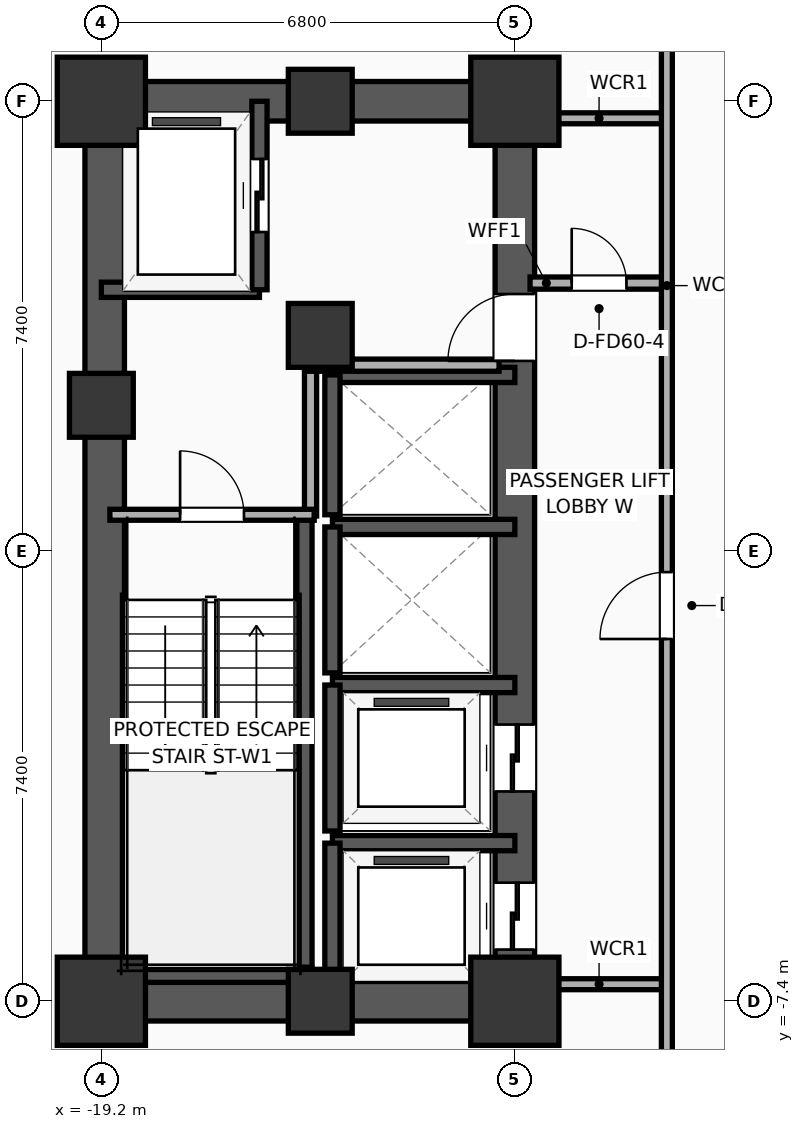
"""IFC4 building model, lengths in metres.
Left out: names, types, materials, properties, quantities, classifications, styles, units other than length and angle.
Written with IfcOpenShell. Run it as: python <this file> out.ifc"""

import sys

from ifc_helpers import new_model, si_unit, direction, frame, frame_2d, origin, origin_2d, place, context, subcontext, project, spatial, rectangle, extrude, element, fill, save


model = new_model("IFC4")
c1 = context("Model", 3, precision=1e-05, world=origin(), true_north=direction((0.0, 1.0)))
c2 = subcontext(c1, "Body", "Model", "MODEL_VIEW")
j1 = project(units=[si_unit("LENGTHUNIT", "METRE"), si_unit("PLANEANGLEUNIT", "RADIAN")], contexts=[c1])
p1 = place(None, origin())
s1 = spatial("IfcSite", under=j1, at=p1, CompositionType="ELEMENT")
p2 = place(p1, origin())
s2 = spatial("IfcBuilding", under=s1, at=p2, CompositionType="ELEMENT")
p3 = place(p2, frame((0.0, 0.0, 72.8)))
s3 = spatial("IfcBuildingStorey", under=s2, at=p3, CompositionType="ELEMENT", Elevation=72.8)
p4 = place(p3, frame((-19.2, -7.4, 0.0), z_axis=(0.0, 0.0, 1.0), x_axis=(1.0, 0.0, 0.0)))
e1 = element("IfcColumn", 1, at=p4, inside=s3, PredefinedType="COLUMN", context=c2, shape_type="SweptSolid", body=[
    extrude(rectangle(XDim=1.45, YDim=1.45, at=origin_2d()), origin(), (0.0, 0.0, 1.0), 3.9),
])
p5 = place(p3, frame((-19.2, 2.4, 0.0), z_axis=(0.0, 0.0, 1.0), x_axis=(1.0, 0.0, 0.0)))
e2 = element("IfcColumn", 2, at=p5, inside=s3, PredefinedType="COLUMN", context=c2, shape_type="SweptSolid", body=[
    extrude(rectangle(XDim=1.05, YDim=1.05, at=origin_2d()), origin(), (0.0, 0.0, 1.0), 3.9),
])
p6 = place(p3, frame((-19.2, 7.4, 0.0), z_axis=(0.0, 0.0, 1.0), x_axis=(1.0, 0.0, 0.0)))
e3 = element("IfcColumn", 3, at=p6, inside=s3, PredefinedType="COLUMN", context=c2, shape_type="SweptSolid", body=[
    extrude(rectangle(XDim=1.45, YDim=1.45, at=origin_2d()), origin(), (0.0, 0.0, 1.0), 3.9),
])
for number, where, z_axis, x_axis in (
    (4, (-15.6, -7.4, 0.0), (0.0, 0.0, 1.0), (1.0, 0.0, 0.0)),
    (5, (-15.6, 7.4, 0.0), (0.0, 0.0, 1.0), (1.0, 0.0, 0.0)),
):
    element("IfcColumn", number, at=place(p3, frame(where, z_axis=z_axis, x_axis=x_axis)), inside=s3, PredefinedType="COLUMN", context=c2, shape_type="SweptSolid", body=[
        extrude(rectangle(XDim=1.05, YDim=1.05, at=origin_2d()), origin(), (0.0, 0.0, 1.0), 3.9),
    ])
p7 = place(p3, frame((-12.4, -7.4, 0.0), z_axis=(0.0, 0.0, 1.0), x_axis=(1.0, 0.0, 0.0)))
e6 = element("IfcColumn", 6, at=p7, inside=s3, PredefinedType="COLUMN", context=c2, shape_type="SweptSolid", body=[
    extrude(rectangle(XDim=1.45, YDim=1.45, at=origin_2d()), origin(), (0.0, 0.0, 1.0), 3.9),
])
p8 = place(p3, frame((-15.6, 3.55, 0.0), z_axis=(0.0, 0.0, 1.0), x_axis=(1.0, 0.0, 0.0)))
e7 = element("IfcColumn", 7, at=p8, inside=s3, PredefinedType="COLUMN", context=c2, shape_type="SweptSolid", body=[
    extrude(rectangle(XDim=1.05, YDim=1.05, at=origin_2d()), origin(), (0.0, 0.0, 1.0), 3.9),
])
p9 = place(p3, frame((-12.4, 7.4, 0.0), z_axis=(0.0, 0.0, 1.0), x_axis=(1.0, 0.0, 0.0)))
e8 = element("IfcColumn", 8, at=p9, inside=s3, PredefinedType="COLUMN", context=c2, shape_type="SweptSolid", body=[
    extrude(rectangle(XDim=1.45, YDim=1.45, at=origin_2d()), origin(), (0.0, 0.0, 1.0), 3.9),
])
for number, where, z_axis, x_axis in (
    (9, (-19.525, -7.4, 0.0), (0.0, 0.0, 1.0), (1.0, 0.0, 0.0)),
    (10, (-19.525, 7.4, 0.0), (0.0, 0.0, 1.0), (1.0, 0.0, 0.0)),
):
    element("IfcWall", number, at=place(p3, frame(where, z_axis=z_axis, x_axis=x_axis)), inside=s3, PredefinedType="SHEAR", context=c2, shape_type="SweptSolid", body=[
        extrude(rectangle(XDim=7.45, YDim=0.65, at=frame_2d((3.725, 0.0))), origin(), (0.0, 0.0, 1.0), 3.65),
    ])
p10 = place(p3, frame((-19.145, -7.4, 0.0), z_axis=(0.0, 0.0, 1.0), x_axis=(0.0, 1.0, 0.0)))
e11 = element("IfcWall", 11, at=p10, inside=s3, PredefinedType="SHEAR", context=c2, shape_type="SweptSolid", body=[
    extrude(rectangle(XDim=14.8, YDim=0.65, at=frame_2d((7.4, 0.0))), origin(), (0.0, 0.0, 1.0), 3.65),
])
p11 = place(p3, frame((-12.4, -7.4, 0.0), z_axis=(0.0, 0.0, 1.0), x_axis=(0.0, 1.0, 0.0)))
e12 = element("IfcWall", 12, at=p11, inside=s3, PredefinedType="SHEAR", context=c2, shape_type="SweptSolid", body=[
    extrude(rectangle(XDim=14.8, YDim=0.65, at=frame_2d((7.4, 0.0))), origin(), (0.0, 0.0, 1.0), 3.65),
])
p12 = place(p11, frame((0.85, 0.0, 0.0)))
e13 = element("IfcOpeningElement", 13, at=p12, cuts=e12, PredefinedType="OPENING", context=c2, shape_type="SweptSolid", body=[
    extrude(rectangle(XDim=1.1, YDim=2.05, at=frame_2d((0.55, 1.025))), frame((0.0, 0.335, 0.0), z_axis=(0.0, -1.0, 0.0), x_axis=(1.0, 0.0, 0.0)), (0.0, 0.0, 1.0), 0.67),
])
p13 = place(p11, frame((3.45, 0.0, 0.0)))
e14 = element("IfcOpeningElement", 14, at=p13, cuts=e12, PredefinedType="OPENING", context=c2, shape_type="SweptSolid", body=[
    extrude(rectangle(XDim=1.1, YDim=2.05, at=frame_2d((0.55, 1.025))), frame((0.0, 0.335, 0.0), z_axis=(0.0, -1.0, 0.0), x_axis=(1.0, 0.0, 0.0)), (0.0, 0.0, 1.0), 0.67),
])
p14 = place(p11, frame((10.53, 0.0, 0.0)))
e15 = element("IfcOpeningElement", 15, at=p14, cuts=e12, PredefinedType="OPENING", context=c2, shape_type="SweptSolid", body=[
    extrude(rectangle(XDim=1.1, YDim=2.05, at=frame_2d((0.55, 1.025))), frame((0.0, 0.335, 0.0), z_axis=(0.0, -1.0, 0.0), x_axis=(1.0, 0.0, 0.0)), (0.0, 0.0, 1.0), 0.67),
])
p15 = place(p3, frame((-15.86, -7.085, 0.0), z_axis=(0.0, 0.0, 1.0), x_axis=(0.0, 1.0, 0.0)))
e16 = element("IfcWall", 16, at=p15, inside=s3, PredefinedType="SOLIDWALL", context=c2, shape_type="SweptSolid", body=[
    extrude(rectangle(XDim=7.685, YDim=0.25, at=frame_2d((3.843, 0.0))), origin(), (0.0, 0.0, 1.0), 3.65),
])
p16 = place(p3, frame((-19.2, -6.965, 0.0), z_axis=(0.0, 0.0, 1.0), x_axis=(1.0, 0.0, 0.0)))
e17 = element("IfcWall", 17, at=p16, inside=s3, PredefinedType="SOLIDWALL", context=c2, shape_type="SweptSolid", body=[
    extrude(rectangle(XDim=3.46, YDim=0.25, at=frame_2d((1.73, 0.0))), origin(), (0.0, 0.0, 1.0), 3.65),
])
p17 = place(p3, frame((-19.2, 4.3, 0.0), z_axis=(0.0, 0.0, 1.0), x_axis=(1.0, 0.0, 0.0)))
e18 = element("IfcWall", 18, at=p17, inside=s3, PredefinedType="SOLIDWALL", context=c2, shape_type="SweptSolid", body=[
    extrude(rectangle(XDim=2.6, YDim=0.25, at=frame_2d((1.3, 0.0))), origin(), (0.0, 0.0, 1.0), 3.65),
])
p18 = place(p3, frame((-16.6, 4.3, 0.0), z_axis=(0.0, 0.0, 1.0), x_axis=(0.0, 1.0, 0.0)))
e19 = element("IfcWall", 19, at=p18, inside=s3, PredefinedType="SOLIDWALL", context=c2, shape_type="SweptSolid", body=[
    extrude(rectangle(XDim=3.1, YDim=0.25, at=frame_2d((1.55, 0.0))), origin(), (0.0, 0.0, 1.0), 3.65),
])
p19 = place(p18, frame((0.95, 0.0, 0.0)))
e20 = element("IfcOpeningElement", 20, at=p19, cuts=e19, PredefinedType="OPENING", context=c2, shape_type="SweptSolid", body=[
    extrude(rectangle(XDim=1.2, YDim=2.05, at=frame_2d((0.6, 1.025))), frame((0.0, 0.135, 0.0), z_axis=(0.0, -1.0, 0.0), x_axis=(1.0, 0.0, 0.0)), (0.0, 0.0, 1.0), 0.27),
])
p20 = place(p3, frame((-12.4, -4.8, 0.0), z_axis=(0.0, 0.0, 1.0), x_axis=(-1.0, 0.0, 0.0)))
e21 = element("IfcWall", 21, at=p20, inside=s3, PredefinedType="SOLIDWALL", context=c2, shape_type="SweptSolid", body=[
    extrude(rectangle(XDim=3.0, YDim=0.25, at=frame_2d((1.5, 0.0))), origin(), (0.0, 0.0, 1.0), 3.65),
])
p21 = place(p3, frame((-15.4, -4.8, 0.0), z_axis=(0.0, 0.0, 1.0), x_axis=(0.0, -1.0, 0.0)))
e22 = element("IfcWall", 22, at=p21, inside=s3, PredefinedType="SOLIDWALL", context=c2, shape_type="SweptSolid", body=[
    extrude(rectangle(XDim=2.6, YDim=0.25, at=frame_2d((1.3, 0.0))), origin(), (0.0, 0.0, 1.0), 3.65),
])
p22 = place(p3, frame((-12.4, -2.2, 0.0), z_axis=(0.0, 0.0, 1.0), x_axis=(-1.0, 0.0, 0.0)))
e23 = element("IfcWall", 23, at=p22, inside=s3, PredefinedType="SOLIDWALL", context=c2, shape_type="SweptSolid", body=[
    extrude(rectangle(XDim=3.0, YDim=0.25, at=frame_2d((1.5, 0.0))), origin(), (0.0, 0.0, 1.0), 3.65),
])
p23 = place(p3, frame((-15.4, -2.2, 0.0), z_axis=(0.0, 0.0, 1.0), x_axis=(0.0, -1.0, 0.0)))
e24 = element("IfcWall", 24, at=p23, inside=s3, PredefinedType="SOLIDWALL", context=c2, shape_type="SweptSolid", body=[
    extrude(rectangle(XDim=2.4, YDim=0.25, at=frame_2d((1.2, 0.0))), origin(), (0.0, 0.0, 1.0), 3.65),
])
p24 = place(p3, frame((-12.4, 0.4, 0.0), z_axis=(0.0, 0.0, 1.0), x_axis=(-1.0, 0.0, 0.0)))
e25 = element("IfcWall", 25, at=p24, inside=s3, PredefinedType="SOLIDWALL", context=c2, shape_type="SweptSolid", body=[
    extrude(rectangle(XDim=3.0, YDim=0.25, at=frame_2d((1.5, 0.0))), origin(), (0.0, 0.0, 1.0), 3.65),
])
p25 = place(p3, frame((-15.4, 0.4, 0.0), z_axis=(0.0, 0.0, 1.0), x_axis=(0.0, -1.0, 0.0)))
e26 = element("IfcWall", 26, at=p25, inside=s3, PredefinedType="SOLIDWALL", context=c2, shape_type="SweptSolid", body=[
    extrude(rectangle(XDim=2.4, YDim=0.25, at=frame_2d((1.2, 0.0))), origin(), (0.0, 0.0, 1.0), 3.65),
])
p26 = place(p3, frame((-12.4, 2.9, 0.0), z_axis=(0.0, 0.0, 1.0), x_axis=(-1.0, 0.0, 0.0)))
e27 = element("IfcWall", 27, at=p26, inside=s3, PredefinedType="SOLIDWALL", context=c2, shape_type="SweptSolid", body=[
    extrude(rectangle(XDim=3.0, YDim=0.25, at=frame_2d((1.5, 0.0))), origin(), (0.0, 0.0, 1.0), 3.65),
])
p27 = place(p3, frame((-15.4, 2.9, 0.0), z_axis=(0.0, 0.0, 1.0), x_axis=(0.0, -1.0, 0.0)))
e28 = element("IfcWall", 28, at=p27, inside=s3, PredefinedType="SOLIDWALL", context=c2, shape_type="SweptSolid", body=[
    extrude(rectangle(XDim=2.3, YDim=0.25, at=frame_2d((1.15, 0.0))), origin(), (0.0, 0.0, 1.0), 3.65),
])
p28 = place(p3, frame((-15.76, 0.58, 0.0), z_axis=(0.0, 0.0, 1.0), x_axis=(0.0, 1.0, 0.0)))
e29 = element("IfcWall", 29, at=p28, inside=s3, PredefinedType="PARTITIONING", context=c2, shape_type="SweptSolid", body=[
    extrude(rectangle(XDim=2.52, YDim=0.2, at=frame_2d((1.26, 0.0))), origin(), (0.0, 0.0, 1.0), 3.65),
])
p29 = place(p3, frame((-15.82, 3.06, 0.0), z_axis=(0.0, 0.0, 1.0), x_axis=(1.0, 0.0, 0.0)))
e30 = element("IfcWall", 30, at=p29, inside=s3, PredefinedType="PARTITIONING", context=c2, shape_type="SweptSolid", body=[
    extrude(rectangle(XDim=3.16, YDim=0.2, at=frame_2d((1.58, 0.0))), origin(), (0.0, 0.0, 1.0), 3.65),
])
p30 = place(p3, frame((-19.06, 0.6, 0.0), z_axis=(0.0, 0.0, 1.0), x_axis=(1.0, 0.0, 0.0)))
e31 = element("IfcWall", 31, at=p30, inside=s3, PredefinedType="PARTITIONING", context=c2, shape_type="SweptSolid", body=[
    extrude(rectangle(XDim=3.36, YDim=0.18, at=frame_2d((1.68, 0.0))), origin(), (0.0, 0.0, 1.0), 3.65),
])
p31 = place(p30, frame((1.155, 0.0, 0.0)))
e32 = element("IfcOpeningElement", 32, at=p31, cuts=e31, PredefinedType="OPENING", context=c2, shape_type="SweptSolid", body=[
    extrude(rectangle(XDim=1.05, YDim=2.05, at=frame_2d((0.525, 1.025))), frame((0.0, 0.1, 0.0), z_axis=(0.0, -1.0, 0.0), x_axis=(1.0, 0.0, 0.0)), (0.0, 0.0, 1.0), 0.2),
])
p32 = place(p3, frame((-12.15, 4.41, 0.0), z_axis=(0.0, 0.0, 1.0), x_axis=(1.0, 0.0, 0.0)))
e33 = element("IfcWall", 33, at=p32, inside=s3, PredefinedType="PARTITIONING", context=c2, shape_type="SweptSolid", body=[
    extrude(rectangle(XDim=2.27, YDim=0.2, at=frame_2d((1.135, 0.0))), origin(), (0.0, 0.0, 1.0), 3.65),
])
p33 = place(p32, frame((0.685, 0.0, 0.0)))
e34 = element("IfcOpeningElement", 34, at=p33, cuts=e33, PredefinedType="OPENING", context=c2, shape_type="SweptSolid", body=[
    extrude(rectangle(XDim=0.9, YDim=2.05, at=frame_2d((0.45, 1.025))), frame((0.0, 0.11, 0.0), z_axis=(0.0, -1.0, 0.0), x_axis=(1.0, 0.0, 0.0)), (0.0, 0.0, 1.0), 0.22),
])
for number, where, z_axis, x_axis in (
    (35, (-12.15, 7.12, 0.0), (0.0, 0.0, 1.0), (1.0, 0.0, 0.0)),
    (36, (-12.15, -7.12, 0.0), (0.0, 0.0, 1.0), (1.0, 0.0, 0.0)),
):
    element("IfcWall", number, at=place(p3, frame(where, z_axis=z_axis, x_axis=x_axis)), inside=s3, PredefinedType="PARTITIONING", context=c2, shape_type="SweptSolid", body=[
        extrude(rectangle(XDim=2.27, YDim=0.18, at=frame_2d((1.135, 0.0))), origin(), (0.0, 0.0, 1.0), 2.94),
    ])
p34 = place(p3, frame((-9.9, -8.93, 0.0), z_axis=(0.0, 0.0, 1.0), x_axis=(0.0, 1.0, 0.0)))
e37 = element("IfcWall", 37, at=p34, inside=s3, PredefinedType="PARTITIONING", context=c2, shape_type="SweptSolid", body=[
    extrude(rectangle(XDim=17.86, YDim=0.18, at=frame_2d((8.93, 0.0))), origin(), (0.0, 0.0, 1.0), 3.65),
])
p35 = place(p34, frame((7.487, 0.0, 0.0)))
e38 = element("IfcOpeningElement", 38, at=p35, cuts=e37, PredefinedType="OPENING", context=c2, shape_type="SweptSolid", body=[
    extrude(rectangle(XDim=1.1, YDim=2.05, at=frame_2d((0.55, 1.025))), frame((0.0, 0.1, 0.0), z_axis=(0.0, -1.0, 0.0), x_axis=(1.0, 0.0, 0.0)), (0.0, 0.0, 1.0), 0.2),
])
p36 = place(p19, origin())
e39 = element("IfcDoor", 39, at=p36, inside=s3, OperationType="SLIDING_TO_LEFT", PredefinedType="DOOR", context=c2, shape_type="SweptSolid", body=[
    extrude(rectangle(XDim=1.2, YDim=2.05, at=frame_2d((0.6, 1.025))), frame((0.0, 0.025, 0.0), z_axis=(0.0, -1.0, 0.0), x_axis=(1.0, 0.0, 0.0)), (0.0, 0.0, 1.0), 0.05),
])
fill(e20, e39)
p37 = place(p12, origin())
e40 = element("IfcDoor", 40, at=p37, inside=s3, OperationType="SLIDING_TO_LEFT", PredefinedType="DOOR", context=c2, shape_type="SweptSolid", body=[
    extrude(rectangle(XDim=1.1, YDim=2.05, at=frame_2d((0.55, 1.025))), frame((0.0, 0.025, 0.0), z_axis=(0.0, -1.0, 0.0), x_axis=(1.0, 0.0, 0.0)), (0.0, 0.0, 1.0), 0.05),
])
fill(e13, e40)
p38 = place(p13, origin())
e41 = element("IfcDoor", 41, at=p38, inside=s3, OperationType="SLIDING_TO_LEFT", PredefinedType="DOOR", context=c2, shape_type="SweptSolid", body=[
    extrude(rectangle(XDim=1.1, YDim=2.05, at=frame_2d((0.55, 1.025))), frame((0.0, 0.025, 0.0), z_axis=(0.0, -1.0, 0.0), x_axis=(1.0, 0.0, 0.0)), (0.0, 0.0, 1.0), 0.05),
])
fill(e14, e41)
p39 = place(p31, origin())
e42 = element("IfcDoor", 42, at=p39, inside=s3, OperationType="SINGLE_SWING_LEFT", PredefinedType="DOOR", context=c2, shape_type="SweptSolid", body=[
    extrude(rectangle(XDim=1.05, YDim=2.05, at=frame_2d((0.525, 1.025))), frame((0.0, 0.025, 0.0), z_axis=(0.0, -1.0, 0.0), x_axis=(1.0, 0.0, 0.0)), (0.0, 0.0, 1.0), 0.05),
])
fill(e32, e42)
p40 = place(p33, origin())
e43 = element("IfcDoor", 43, at=p40, inside=s3, OperationType="SINGLE_SWING_LEFT", PredefinedType="DOOR", context=c2, shape_type="SweptSolid", body=[
    extrude(rectangle(XDim=0.9, YDim=2.05, at=frame_2d((0.45, 1.025))), frame((0.0, 0.025, 0.0), z_axis=(0.0, -1.0, 0.0), x_axis=(1.0, 0.0, 0.0)), (0.0, 0.0, 1.0), 0.05),
])
fill(e34, e43)
p41 = place(p35, origin())
e44 = element("IfcDoor", 44, at=p41, inside=s3, OperationType="SINGLE_SWING_LEFT", PredefinedType="DOOR", context=c2, shape_type="SweptSolid", body=[
    extrude(rectangle(XDim=1.1, YDim=2.05, at=frame_2d((0.55, 1.025))), frame((0.0, 0.025, 0.0), z_axis=(0.0, -1.0, 0.0), x_axis=(1.0, 0.0, 0.0)), (0.0, 0.0, 1.0), 0.05),
])
fill(e38, e44)
p42 = place(p14, origin())
e45 = element("IfcDoor", 45, at=p42, inside=s3, OperationType="SINGLE_SWING_LEFT", PredefinedType="DOOR", context=c2, shape_type="SweptSolid", body=[
    extrude(rectangle(XDim=1.1, YDim=2.05, at=frame_2d((0.55, 1.025))), frame((0.0, 0.025, 0.0), z_axis=(0.0, -1.0, 0.0), x_axis=(1.0, 0.0, 0.0)), (0.0, 0.0, 1.0), 0.05),
])
fill(e15, e45)
save(model, sys.argv[1])
